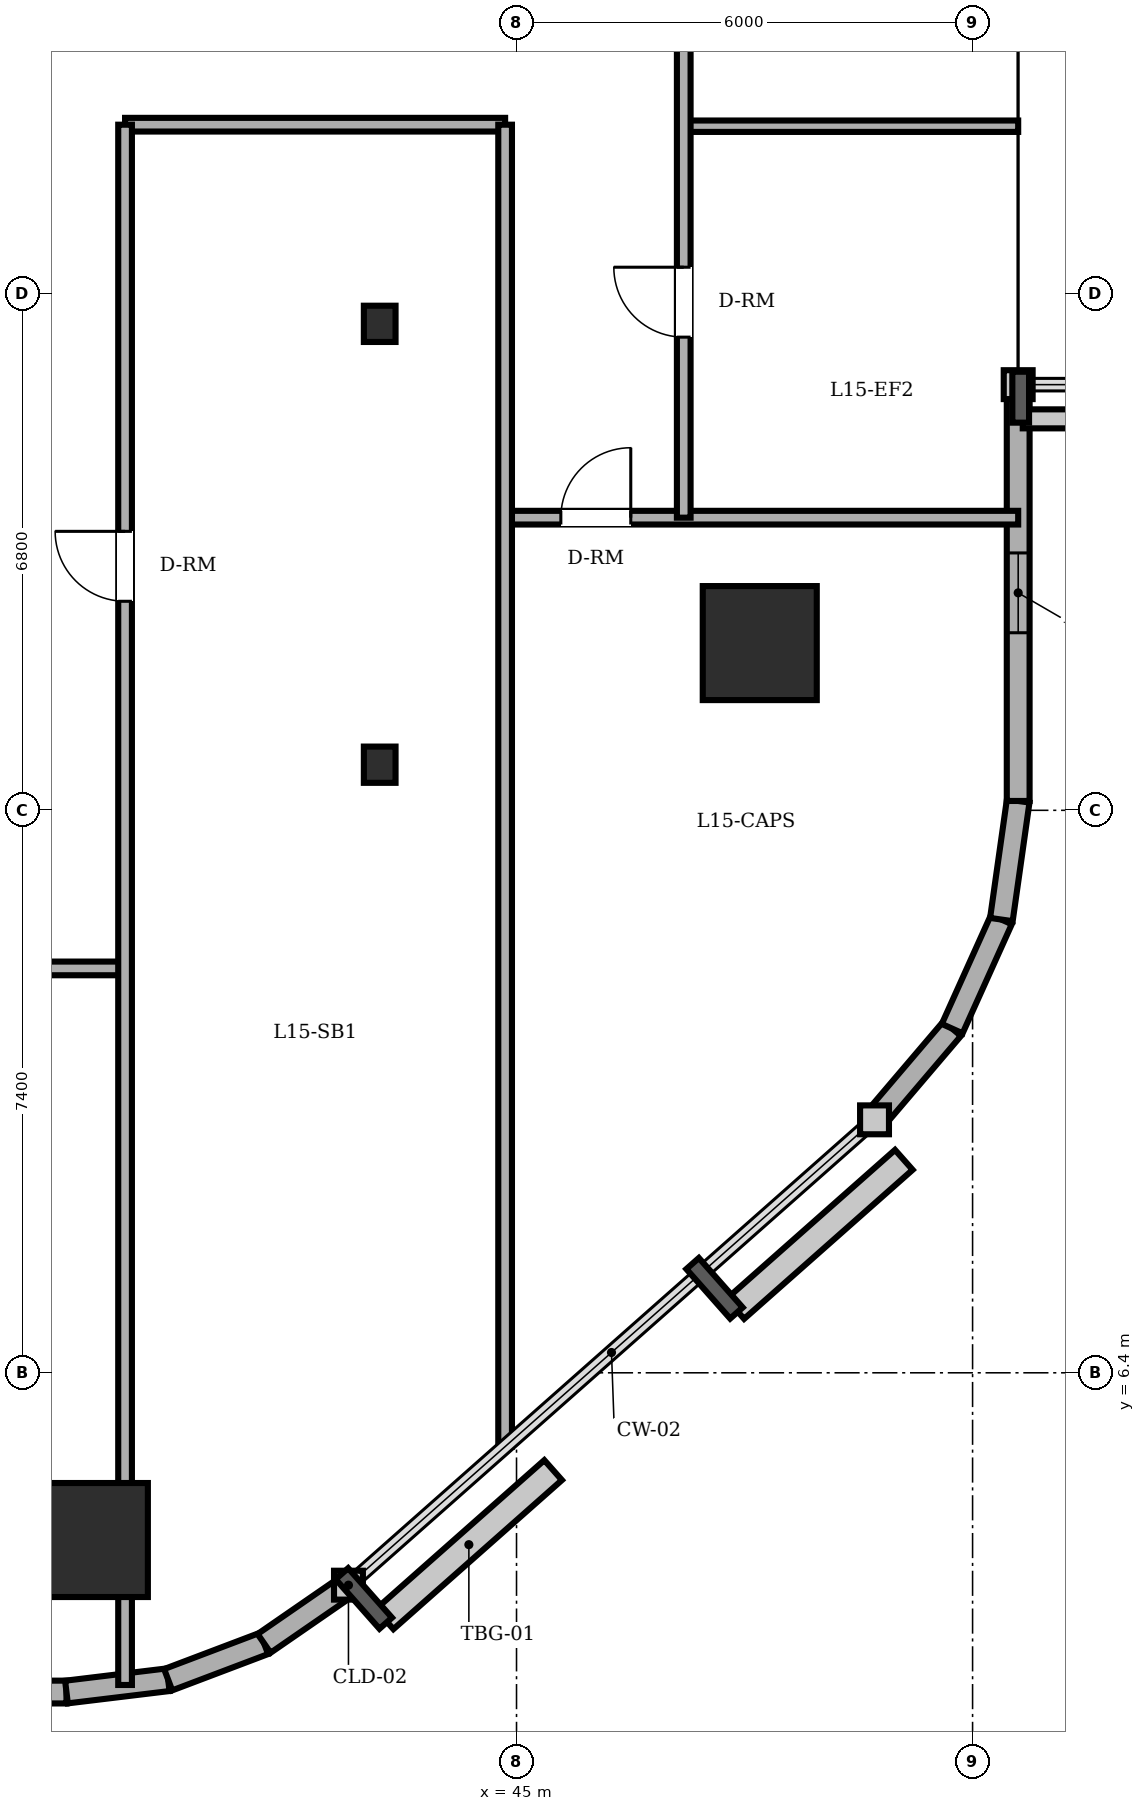
"""IFC4 building model, lengths in metres.
Left out: names, types, materials, properties, quantities, classifications, styles, units other than length and angle.
Written with IfcOpenShell. Run it as: python <this file> out.ifc"""

import sys

from ifc_helpers import new_model, si_unit, direction, frame, frame_2d, origin, origin_2d, place, context, subcontext, project, spatial, rectangle, circle, i_section, extrude, element, fill, save


model = new_model("IFC4")
c1 = context("Model", 3, precision=1e-05, world=origin(), true_north=direction((0.0, 1.0)))
c2 = subcontext(c1, "Body", "Model", "MODEL_VIEW")
j1 = project(units=[si_unit("LENGTHUNIT", "METRE"), si_unit("PLANEANGLEUNIT", "RADIAN")], contexts=[c1])
p1 = place(None, origin())
s1 = spatial("IfcSite", under=j1, at=p1, CompositionType="ELEMENT")
p2 = place(p1, origin())
s2 = spatial("IfcBuilding", under=s1, at=p2, CompositionType="ELEMENT")
p3 = place(p2, frame((0.0, 0.0, 57.6)))
s3 = spatial("IfcBuildingStorey", under=s2, at=p3, CompositionType="ELEMENT", Elevation=57.6)
for number, where, z_axis, x_axis in (
    (1, (39.4, 4.2, 0.0), (0.0, 0.0, 1.0), (1.0, 0.0, 0.0)),
    (2, (48.2, 16.0, 0.0), (0.0, 0.0, 1.0), (1.0, 0.0, 0.0)),
):
    element("IfcColumn", number, at=place(p3, frame(where, z_axis=z_axis, x_axis=x_axis)), inside=s3, PredefinedType="COLUMN", context=c2, shape_type="SweptSolid", body=[
        extrude(circle(Radius=0.75, at=origin_2d()), origin(), (0.0, 0.0, 1.0), 3.6),
    ])
for number, where, z_axis, x_axis in (
    (3, (43.2, 14.4, 0.0), (0.0, 0.0, 1.0), (1.0, 0.0, 0.0)),
    (4, (43.2, 20.2, 0.0), (0.0, 0.0, 1.0), (1.0, 0.0, 0.0)),
):
    element("IfcColumn", number, at=place(p3, frame(where, z_axis=z_axis, x_axis=x_axis)), inside=s3, PredefinedType="COLUMN", context=c2, shape_type="SweptSolid", body=[
        extrude(i_section(OverallWidth=0.417, OverallDepth=0.477, WebThickness=0.036, FlangeThickness=0.057, FilletRadius=0.015, at=origin_2d()), origin(), (0.0, 0.0, 1.0), 3.6),
    ])
p4 = place(p3, frame((9.0, 2.2, 0.0), z_axis=(0.0, 0.0, 1.0), x_axis=(1.0, 0.0, 0.0)))
e5 = element("IfcWall", 5, at=p4, inside=s3, PredefinedType="SOLIDWALL", context=c2, shape_type="SweptSolid", body=[
    extrude(rectangle(XDim=30.079, YDim=0.3, at=frame_2d((15.04, 0.0))), origin(), (0.0, 0.0, 1.0), 3.4),
])
p5 = place(p4, frame((8.175, 0.0, 0.0)))
e6 = element("IfcOpeningElement", 6, at=p5, cuts=e5, PredefinedType="OPENING", context=c2, shape_type="SweptSolid", body=[
    extrude(rectangle(XDim=0.95, YDim=2.2, at=frame_2d((0.475, 1.1))), frame((0.0, 0.16, 0.0), z_axis=(0.0, -1.0, 0.0), x_axis=(1.0, 0.0, 0.0)), (0.0, 0.0, 1.0), 0.32),
])
p6 = place(p4, frame((4.067, 0.0, 0.85)))
e7 = element("IfcOpeningElement", 7, at=p6, cuts=e5, PredefinedType="OPENING", context=c2, shape_type="SweptSolid", body=[
    extrude(rectangle(XDim=1.8, YDim=1.55, at=frame_2d((0.9, 0.775))), frame((0.0, 0.16, 0.0), z_axis=(0.0, -1.0, 0.0), x_axis=(1.0, 0.0, 0.0)), (0.0, 0.0, 1.0), 0.32),
])
p7 = place(p4, frame((15.2, 0.0, 0.85)))
e8 = element("IfcOpeningElement", 8, at=p7, cuts=e5, PredefinedType="OPENING", context=c2, shape_type="SweptSolid", body=[
    extrude(rectangle(XDim=1.8, YDim=1.55, at=frame_2d((0.9, 0.775))), frame((0.0, 0.16, 0.0), z_axis=(0.0, -1.0, 0.0), x_axis=(1.0, 0.0, 0.0)), (0.0, 0.0, 1.0), 0.32),
])
p8 = place(p4, frame((21.01, 0.0, 0.85)))
e9 = element("IfcOpeningElement", 9, at=p8, cuts=e5, PredefinedType="OPENING", context=c2, shape_type="SweptSolid", body=[
    extrude(rectangle(XDim=1.8, YDim=1.55, at=frame_2d((0.9, 0.775))), frame((0.0, 0.16, 0.0), z_axis=(0.0, -1.0, 0.0), x_axis=(1.0, 0.0, 0.0)), (0.0, 0.0, 1.0), 0.32),
])
p9 = place(p4, frame((24.919, 0.0, 0.85)))
e10 = element("IfcOpeningElement", 10, at=p9, cuts=e5, PredefinedType="OPENING", context=c2, shape_type="SweptSolid", body=[
    extrude(rectangle(XDim=1.8, YDim=1.55, at=frame_2d((0.9, 0.775))), frame((0.0, 0.16, 0.0), z_axis=(0.0, -1.0, 0.0), x_axis=(1.0, 0.0, 0.0)), (0.0, 0.0, 1.0), 0.32),
])
p10 = place(p3, frame((39.079, 2.2, 0.0), z_axis=(0.0, 0.0, 1.0), x_axis=(0.992739027259, 0.120288086515, 0.0)))
e11 = element("IfcWall", 11, at=p10, inside=s3, PredefinedType="SOLIDWALL", context=c2, shape_type="SweptSolid", body=[
    extrude(rectangle(XDim=1.348, YDim=0.3, at=frame_2d((0.674, 0.0))), origin(), (0.0, 0.0, 1.0), 3.4),
])
p11 = place(p3, frame((40.417, 2.362, 0.0), z_axis=(0.0, 0.0, 1.0), x_axis=(0.935156721165, 0.354234254216, 0.0)))
e12 = element("IfcWall", 12, at=p11, inside=s3, PredefinedType="SOLIDWALL", context=c2, shape_type="SweptSolid", body=[
    extrude(rectangle(XDim=1.349, YDim=0.3, at=frame_2d((0.675, 0.0))), origin(), (0.0, 0.0, 1.0), 3.4),
])
p12 = place(p3, frame((41.679, 2.84, 0.0), z_axis=(0.0, 0.0, 1.0), x_axis=(0.823116500192, 0.567872544777, 0.0)))
e13 = element("IfcWall", 13, at=p12, inside=s3, PredefinedType="SOLIDWALL", context=c2, shape_type="SweptSolid", body=[
    extrude(rectangle(XDim=1.349, YDim=0.3, at=frame_2d((0.674, 0.0))), origin(), (0.0, 0.0, 1.0), 3.4),
])
p13 = place(p3, frame((49.71, 9.728, 0.0), z_axis=(0.0, 0.0, 1.0), x_axis=(0.648389989909, 0.7613083613, 0.0)))
e14 = element("IfcWall", 14, at=p13, inside=s3, PredefinedType="SOLIDWALL", context=c2, shape_type="SweptSolid", body=[
    extrude(rectangle(XDim=1.576, YDim=0.3, at=frame_2d((0.788, 0.0))), origin(), (0.0, 0.0, 1.0), 3.4),
])
p14 = place(p3, frame((50.732, 10.928, 0.0), z_axis=(0.0, 0.0, 1.0), x_axis=(0.410996558744, 0.911636895206, 0.0)))
e15 = element("IfcWall", 15, at=p14, inside=s3, PredefinedType="SOLIDWALL", context=c2, shape_type="SweptSolid", body=[
    extrude(rectangle(XDim=1.574, YDim=0.3, at=frame_2d((0.787, 0.0))), origin(), (0.0, 0.0, 1.0), 3.4),
])
p15 = place(p3, frame((51.379, 12.363, 0.0), z_axis=(0.0, 0.0, 1.0), x_axis=(0.140380048512, 0.990097693149, 0.0)))
e16 = element("IfcWall", 16, at=p15, inside=s3, PredefinedType="SOLIDWALL", context=c2, shape_type="SweptSolid", body=[
    extrude(rectangle(XDim=1.576, YDim=0.3, at=frame_2d((0.788, 0.0))), origin(), (0.0, 0.0, 1.0), 3.4),
])
p16 = place(p3, frame((51.6, 13.923, 0.0), z_axis=(0.0, 0.0, 1.0), x_axis=(0.0, 1.0, 0.0)))
e17 = element("IfcWall", 17, at=p16, inside=s3, PredefinedType="SOLIDWALL", context=c2, shape_type="SweptSolid", body=[
    extrude(rectangle(XDim=5.477, YDim=0.3, at=frame_2d((2.738, 0.0))), origin(), (0.0, 0.0, 1.0), 3.4),
])
p17 = place(p16, frame((2.213, 0.0, 0.85)))
e18 = element("IfcOpeningElement", 18, at=p17, cuts=e17, PredefinedType="OPENING", context=c2, shape_type="SweptSolid", body=[
    extrude(rectangle(XDim=1.05, YDim=1.55, at=frame_2d((0.525, 0.775))), frame((0.0, 0.16, 0.0), z_axis=(0.0, -1.0, 0.0), x_axis=(1.0, 0.0, 0.0)), (0.0, 0.0, 1.0), 0.32),
])
p18 = place(p3, frame((3.4, 11.72, 0.0), z_axis=(0.0, 0.0, 1.0), x_axis=(1.0, 0.0, 0.0)))
e19 = element("IfcWall", 19, at=p18, inside=s3, PredefinedType="PARTITIONING", context=c2, shape_type="SweptSolid", body=[
    extrude(rectangle(XDim=36.45, YDim=0.18, at=frame_2d((18.225, 0.0))), origin(), (0.0, 0.0, 1.0), 3.4),
])
p19 = place(p18, frame((21.24, 0.0, 0.0)))
e20 = element("IfcOpeningElement", 20, at=p19, cuts=e19, PredefinedType="OPENING", context=c2, shape_type="SweptSolid", body=[
    extrude(rectangle(XDim=0.92, YDim=2.1, at=frame_2d((0.46, 1.05))), frame((0.0, 0.1, 0.0), z_axis=(0.0, -1.0, 0.0), x_axis=(1.0, 0.0, 0.0)), (0.0, 0.0, 1.0), 0.2),
])
p20 = place(p18, frame((10.7, 0.0, 0.0)))
e21 = element("IfcOpeningElement", 21, at=p20, cuts=e19, PredefinedType="OPENING", context=c2, shape_type="SweptSolid", body=[
    extrude(rectangle(XDim=1.0, YDim=2.15, at=frame_2d((0.5, 1.075))), frame((0.0, 0.1, 0.0), z_axis=(0.0, -1.0, 0.0), x_axis=(1.0, 0.0, 0.0)), (0.0, 0.0, 1.0), 0.2),
])
p21 = place(p18, frame((29.305, 0.0, 0.0)))
e22 = element("IfcOpeningElement", 22, at=p21, cuts=e19, PredefinedType="OPENING", context=c2, shape_type="SweptSolid", body=[
    extrude(rectangle(XDim=0.92, YDim=2.1, at=frame_2d((0.46, 1.05))), frame((0.0, 0.1, 0.0), z_axis=(0.0, -1.0, 0.0), x_axis=(1.0, 0.0, 0.0)), (0.0, 0.0, 1.0), 0.2),
])
p22 = place(p3, frame((44.85, 17.65, 0.0), z_axis=(0.0, 0.0, 1.0), x_axis=(1.0, 0.0, 0.0)))
e23 = element("IfcWall", 23, at=p22, inside=s3, PredefinedType="PARTITIONING", context=c2, shape_type="SweptSolid", body=[
    extrude(rectangle(XDim=6.75, YDim=0.18, at=frame_2d((3.375, 0.0))), origin(), (0.0, 0.0, 1.0), 3.4),
])
p23 = place(p22, frame((0.733, 0.0, 0.0)))
e24 = element("IfcOpeningElement", 24, at=p23, cuts=e23, PredefinedType="OPENING", context=c2, shape_type="SweptSolid", body=[
    extrude(rectangle(XDim=0.92, YDim=2.1, at=frame_2d((0.46, 1.05))), frame((0.0, 0.1, 0.0), z_axis=(0.0, -1.0, 0.0), x_axis=(1.0, 0.0, 0.0)), (0.0, 0.0, 1.0), 0.2),
])
p24 = place(p3, frame((39.85, 22.82, 0.0), z_axis=(0.0, 0.0, 1.0), x_axis=(1.0, 0.0, 0.0)))
e25 = element("IfcWall", 25, at=p24, inside=s3, PredefinedType="PARTITIONING", context=c2, shape_type="SweptSolid", body=[
    extrude(rectangle(XDim=5.0, YDim=0.18, at=frame_2d((2.5, 0.0))), origin(), (0.0, 0.0, 1.0), 3.4),
])
p25 = place(p3, frame((47.2, 22.8, 0.0), z_axis=(0.0, 0.0, 1.0), x_axis=(1.0, 0.0, 0.0)))
e26 = element("IfcWall", 26, at=p25, inside=s3, PredefinedType="PARTITIONING", context=c2, shape_type="SweptSolid", body=[
    extrude(rectangle(XDim=4.4, YDim=0.15, at=frame_2d((2.2, 0.0))), origin(), (0.0, 0.0, 1.0), 3.4),
])
p26 = place(p3, frame((39.85, 2.293, 0.0), z_axis=(0.0, 0.0, 1.0), x_axis=(0.0, 1.0, 0.0)))
e27 = element("IfcWall", 27, at=p26, inside=s3, PredefinedType="PARTITIONING", context=c2, shape_type="SweptSolid", body=[
    extrude(rectangle(XDim=20.527, YDim=0.18, at=frame_2d((10.264, 0.0))), origin(), (0.0, 0.0, 1.0), 2.782),
])
p27 = place(p26, frame((14.257, 0.0, 0.0)))
e28 = element("IfcOpeningElement", 28, at=p27, cuts=e27, PredefinedType="OPENING", context=c2, shape_type="SweptSolid", body=[
    extrude(rectangle(XDim=0.92, YDim=2.1, at=frame_2d((0.46, 1.05))), frame((0.0, 0.1, 0.0), z_axis=(0.0, -1.0, 0.0), x_axis=(1.0, 0.0, 0.0)), (0.0, 0.0, 1.0), 0.2),
])
p28 = place(p3, frame((44.85, 5.429, 0.0), z_axis=(0.0, 0.0, 1.0), x_axis=(0.0, 1.0, 0.0)))
e29 = element("IfcWall", 29, at=p28, inside=s3, PredefinedType="PARTITIONING", context=c2, shape_type="SweptSolid", body=[
    extrude(rectangle(XDim=17.391, YDim=0.18, at=frame_2d((8.696, 0.0))), origin(), (0.0, 0.0, 1.0), 3.4),
])
p29 = place(p3, frame((47.2, 17.65, 0.0), z_axis=(0.0, 0.0, 1.0), x_axis=(0.0, 1.0, 0.0)))
e30 = element("IfcWall", 30, at=p29, inside=s3, PredefinedType="PARTITIONING", context=c2, shape_type="SweptSolid", body=[
    extrude(rectangle(XDim=12.7, YDim=0.18, at=frame_2d((6.35, 0.0))), origin(), (0.0, 0.0, 1.0), 3.4),
])
p30 = place(p29, frame((8.205, 0.0, 0.0)))
e31 = element("IfcOpeningElement", 31, at=p30, cuts=e30, PredefinedType="OPENING", context=c2, shape_type="SweptSolid", body=[
    extrude(rectangle(XDim=0.92, YDim=2.1, at=frame_2d((0.46, 1.05))), frame((0.0, 0.1, 0.0), z_axis=(0.0, -1.0, 0.0), x_axis=(1.0, 0.0, 0.0)), (0.0, 0.0, 1.0), 0.2),
])
p31 = place(p29, frame((2.375, 0.0, 0.0)))
e32 = element("IfcOpeningElement", 32, at=p31, cuts=e30, PredefinedType="OPENING", context=c2, shape_type="SweptSolid", body=[
    extrude(rectangle(XDim=0.92, YDim=2.1, at=frame_2d((0.46, 1.05))), frame((0.0, 0.1, 0.0), z_axis=(0.0, -1.0, 0.0), x_axis=(1.0, 0.0, 0.0)), (0.0, 0.0, 1.0), 0.2),
])
p32 = place(p17, origin())
e33 = element("IfcWindow", 33, at=p32, inside=s3, PartitioningType="SINGLE_PANEL", PredefinedType="WINDOW", context=c2, shape_type="SweptSolid", body=[
    extrude(rectangle(XDim=1.05, YDim=1.55, at=frame_2d((0.525, 0.775))), frame((0.0, 0.03, 0.0), z_axis=(0.0, -1.0, 0.0), x_axis=(1.0, 0.0, 0.0)), (0.0, 0.0, 1.0), 0.06),
])
fill(e18, e33)
p33 = place(p27, origin())
e34 = element("IfcDoor", 34, at=p33, inside=s3, OperationType="SINGLE_SWING_RIGHT", PredefinedType="DOOR", context=c2, shape_type="SweptSolid", body=[
    extrude(rectangle(XDim=0.92, YDim=2.1, at=frame_2d((0.46, 1.05))), frame((0.0, 0.025, 0.0), z_axis=(0.0, -1.0, 0.0), x_axis=(1.0, 0.0, 0.0)), (0.0, 0.0, 1.0), 0.05),
])
fill(e28, e34)
p34 = place(p23, origin())
e35 = element("IfcDoor", 35, at=p34, inside=s3, OperationType="SINGLE_SWING_RIGHT", PredefinedType="DOOR", context=c2, shape_type="SweptSolid", body=[
    extrude(rectangle(XDim=0.92, YDim=2.1, at=frame_2d((0.46, 1.05))), frame((0.0, 0.025, 0.0), z_axis=(0.0, -1.0, 0.0), x_axis=(1.0, 0.0, 0.0)), (0.0, 0.0, 1.0), 0.05),
])
fill(e24, e35)
p35 = place(p31, origin())
e36 = element("IfcDoor", 36, at=p35, inside=s3, OperationType="SINGLE_SWING_RIGHT", PredefinedType="DOOR", context=c2, shape_type="SweptSolid", body=[
    extrude(rectangle(XDim=0.92, YDim=2.1, at=frame_2d((0.46, 1.05))), frame((0.0, 0.025, 0.0), z_axis=(0.0, -1.0, 0.0), x_axis=(1.0, 0.0, 0.0)), (0.0, 0.0, 1.0), 0.05),
])
fill(e32, e36)
save(model, sys.argv[1])
